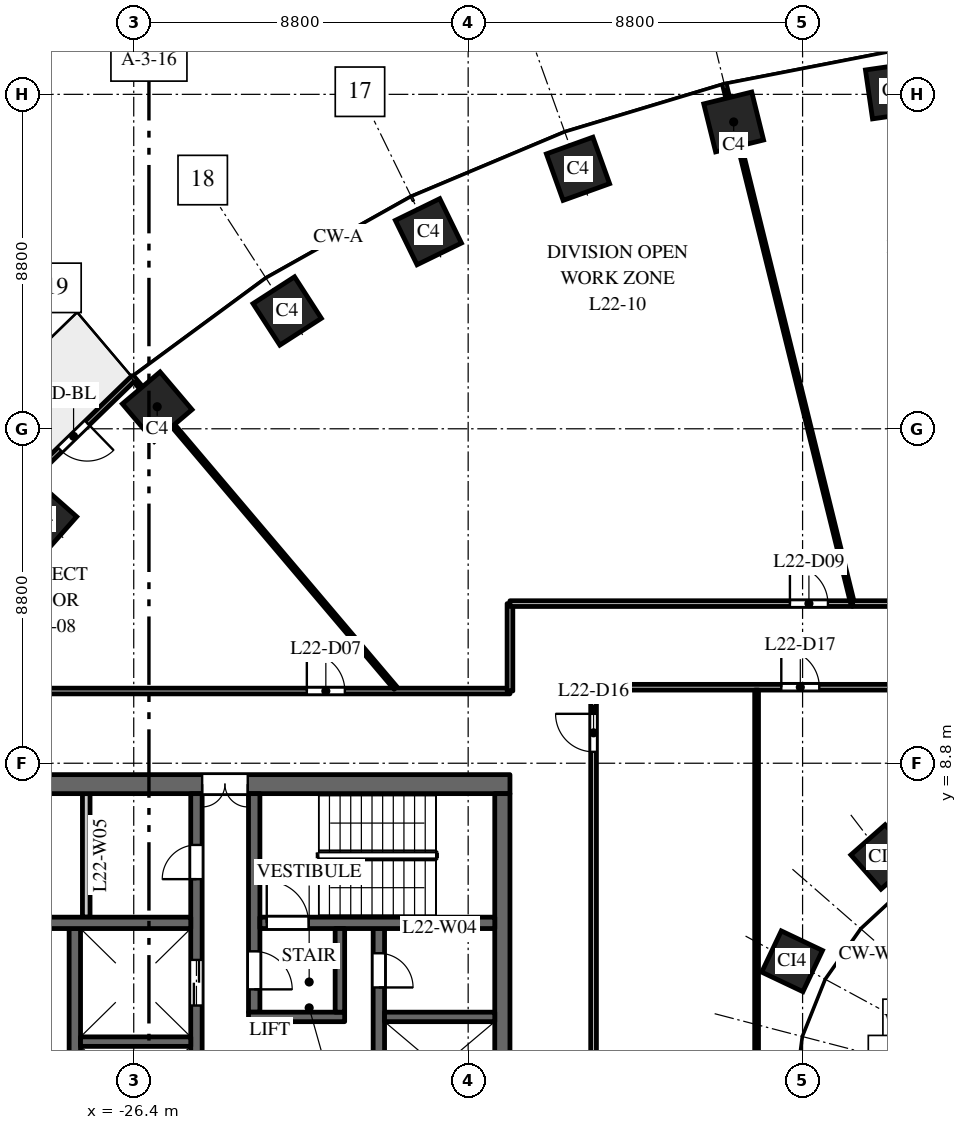
"""IFC4 building model, lengths in metres.
Left out: names, types, materials, properties, quantities, classifications, styles, units other than length and angle.
Written with IfcOpenShell. Run it as: python <this file> out.ifc"""

import sys

from ifc_helpers import new_model, si_unit, direction, frame, frame_2d, origin, origin_2d, place, context, subcontext, project, spatial, rectangle, extrude, element, fill, save


model = new_model("IFC4")
c1 = context("Model", 3, precision=1e-05, world=origin(), true_north=direction((0.0, 1.0)))
c2 = subcontext(c1, "Body", "Model", "MODEL_VIEW")
j1 = project(units=[si_unit("LENGTHUNIT", "METRE"), si_unit("PLANEANGLEUNIT", "RADIAN")], contexts=[c1])
p1 = place(None, origin())
s1 = spatial("IfcSite", under=j1, at=p1, CompositionType="ELEMENT")
p2 = place(p1, origin())
s2 = spatial("IfcBuilding", under=s1, at=p2, CompositionType="ELEMENT")
p3 = place(p2, frame((0.0, 0.0, 100.0)))
s3 = spatial("IfcBuildingStorey", under=s2, at=p3, CompositionType="ELEMENT", Elevation=100.0)
for number, where, z_axis, x_axis in (
    (1, (-6.409, 26.491, 0.0), (0.0, 0.0, 1.0), (-0.99, -0.143, 0.0)),
    (2, (-10.613, 25.674, 0.0), (0.0, 0.0, 1.0), (-0.971, -0.24, 0.0)),
    (3, (-14.709, 24.441, 0.0), (0.0, 0.0, 1.0), (-0.941, -0.338, 0.0)),
    (4, (-18.646, 22.785, 0.0), (0.0, 0.0, 1.0), (-0.898, -0.439, 0.0)),
    (5, (-22.362, 20.7, 0.0), (0.0, 0.0, 1.0), (-0.84, -0.542, 0.0)),
    (6, (-25.783, 18.18, 0.0), (0.0, 0.0, 1.0), (-0.763, -0.646, 0.0)),
    (7, (-28.819, 15.23, 0.0), (0.0, 0.0, 1.0), (-0.663, -0.749, 0.0)),
):
    element("IfcColumn", number, at=place(p3, frame(where, z_axis=z_axis, x_axis=x_axis)), inside=s3, PredefinedType="COLUMN", context=c2, shape_type="SweptSolid", body=[
        extrude(rectangle(XDim=1.3, YDim=1.3, at=origin_2d()), origin(), (0.0, 0.0, 1.0), 4.0),
    ])
for number, where, z_axis, x_axis in (
    (8, (-6.682, 6.334, 0.0), (0.0, 0.0, 1.0), (-0.751, -0.66, 0.0)),
    (9, (-9.076, 3.588, 0.0), (0.0, 0.0, 1.0), (-0.429, -0.903, 0.0)),
):
    element("IfcColumn", number, at=place(p3, frame(where, z_axis=z_axis, x_axis=x_axis)), inside=s3, PredefinedType="COLUMN", context=c2, shape_type="SweptSolid", body=[
        extrude(rectangle(XDim=1.2, YDim=1.2, at=origin_2d()), origin(), (0.0, 0.0, 1.0), 4.0),
    ])
p4 = place(p3, frame((-16.5, 8.25, 0.0), z_axis=(0.0, 0.0, 1.0), x_axis=(-1.0, 0.0, 0.0)))
e10 = element("IfcWall", 10, at=p4, inside=s3, PredefinedType="SHEAR", context=c2, shape_type="SweptSolid", body=[
    extrude(rectangle(XDim=15.0, YDim=0.5, at=frame_2d((7.5, 0.0))), origin(), (0.0, 0.0, 1.0), 3.7),
])
p5 = place(p4, frame((6.9, 0.0, 0.0)))
e11 = element("IfcOpeningElement", 11, at=p5, cuts=e10, PredefinedType="OPENING", context=c2, shape_type="SweptSolid", body=[
    extrude(rectangle(XDim=1.2, YDim=2.1, at=frame_2d((0.6, 1.05))), frame((0.0, 0.26, 0.0), z_axis=(0.0, -1.0, 0.0), x_axis=(1.0, 0.0, 0.0)), (0.0, 0.0, 1.0), 0.52),
])
p6 = place(p4, frame((12.425, 0.0, 0.0)))
e12 = element("IfcOpeningElement", 12, at=p6, cuts=e10, PredefinedType="OPENING", context=c2, shape_type="SweptSolid", body=[
    extrude(rectangle(XDim=0.9, YDim=2.1, at=frame_2d((0.45, 1.05))), frame((0.0, 0.26, 0.0), z_axis=(0.0, -1.0, 0.0), x_axis=(1.0, 0.0, 0.0)), (0.0, 0.0, 1.0), 0.52),
])
p7 = place(p3, frame((-27.95, -4.45, 0.0), z_axis=(0.0, 0.0, 1.0), x_axis=(0.0, 1.0, 0.0)))
e13 = element("IfcWall", 13, at=p7, inside=s3, PredefinedType="SHEAR", context=c2, shape_type="SweptSolid", body=[
    extrude(rectangle(XDim=8.9, YDim=0.3, at=frame_2d((4.45, 0.0))), origin(), (0.0, 0.0, 1.0), 3.7),
])
p8 = place(p3, frame((-19.95, -4.45, 0.0), z_axis=(0.0, 0.0, 1.0), x_axis=(0.0, 1.0, 0.0)))
e14 = element("IfcWall", 14, at=p8, inside=s3, PredefinedType="SHEAR", context=c2, shape_type="SweptSolid", body=[
    extrude(rectangle(XDim=8.9, YDim=0.3, at=frame_2d((4.45, 0.0))), origin(), (0.0, 0.0, 1.0), 3.7),
])
p9 = place(p8, frame((0.775, 0.0, 0.0)))
e15 = element("IfcOpeningElement", 15, at=p9, cuts=e14, PredefinedType="OPENING", context=c2, shape_type="SweptSolid", body=[
    extrude(rectangle(XDim=1.2, YDim=2.1, at=frame_2d((0.6, 1.05))), frame((0.0, 0.16, 0.0), z_axis=(0.0, -1.0, 0.0), x_axis=(1.0, 0.0, 0.0)), (0.0, 0.0, 1.0), 0.32),
])
p10 = place(p8, frame((7.35, 0.0, 0.0)))
e16 = element("IfcOpeningElement", 16, at=p10, cuts=e14, PredefinedType="OPENING", context=c2, shape_type="SweptSolid", body=[
    extrude(rectangle(XDim=0.9, YDim=2.1, at=frame_2d((0.45, 1.05))), frame((0.0, 0.16, 0.0), z_axis=(0.0, -1.0, 0.0), x_axis=(1.0, 0.0, 0.0)), (0.0, 0.0, 1.0), 0.32),
])
p11 = place(p3, frame((-24.75, -8.0, 0.0), z_axis=(0.0, 0.0, 1.0), x_axis=(0.0, 1.0, 0.0)))
e17 = element("IfcWall", 17, at=p11, inside=s3, PredefinedType="SHEAR", context=c2, shape_type="SweptSolid", body=[
    extrude(rectangle(XDim=16.0, YDim=0.3, at=frame_2d((8.0, 0.0))), origin(), (0.0, 0.0, 1.0), 3.7),
])
p12 = place(p11, frame((4.425, 0.0, 0.0)))
e18 = element("IfcOpeningElement", 18, at=p12, cuts=e17, PredefinedType="OPENING", context=c2, shape_type="SweptSolid", body=[
    extrude(rectangle(XDim=1.1, YDim=2.1, at=frame_2d((0.55, 1.05))), frame((0.0, 0.16, 0.0), z_axis=(0.0, -1.0, 0.0), x_axis=(1.0, 0.0, 0.0)), (0.0, 0.0, 1.0), 0.32),
])
p13 = place(p11, frame((7.45, 0.0, 0.0)))
e19 = element("IfcOpeningElement", 19, at=p13, cuts=e17, PredefinedType="OPENING", context=c2, shape_type="SweptSolid", body=[
    extrude(rectangle(XDim=1.1, YDim=2.1, at=frame_2d((0.55, 1.05))), frame((0.0, 0.16, 0.0), z_axis=(0.0, -1.0, 0.0), x_axis=(1.0, 0.0, 0.0)), (0.0, 0.0, 1.0), 0.32),
])
p14 = place(p11, frame((10.425, 0.0, 0.0)))
e20 = element("IfcOpeningElement", 20, at=p14, cuts=e17, PredefinedType="OPENING", context=c2, shape_type="SweptSolid", body=[
    extrude(rectangle(XDim=1.2, YDim=2.1, at=frame_2d((0.6, 1.05))), frame((0.0, 0.16, 0.0), z_axis=(0.0, -1.0, 0.0), x_axis=(1.0, 0.0, 0.0)), (0.0, 0.0, 1.0), 0.32),
])
p15 = place(p11, frame((13.75, 0.0, 0.0)))
e21 = element("IfcOpeningElement", 21, at=p15, cuts=e17, PredefinedType="OPENING", context=c2, shape_type="SweptSolid", body=[
    extrude(rectangle(XDim=0.9, YDim=2.1, at=frame_2d((0.45, 1.05))), frame((0.0, 0.16, 0.0), z_axis=(0.0, -1.0, 0.0), x_axis=(1.0, 0.0, 0.0)), (0.0, 0.0, 1.0), 0.32),
])
p16 = place(p11, frame((1.975, 0.0, 0.0)))
e22 = element("IfcOpeningElement", 22, at=p16, cuts=e17, PredefinedType="OPENING", context=c2, shape_type="SweptSolid", body=[
    extrude(rectangle(XDim=0.9, YDim=2.1, at=frame_2d((0.45, 1.05))), frame((0.0, 0.16, 0.0), z_axis=(0.0, -1.0, 0.0), x_axis=(1.0, 0.0, 0.0)), (0.0, 0.0, 1.0), 0.32),
])
p17 = place(p11, frame((0.35, 0.0, 0.0)))
e23 = element("IfcOpeningElement", 23, at=p17, cuts=e17, PredefinedType="OPENING", context=c2, shape_type="SweptSolid", body=[
    extrude(rectangle(XDim=0.9, YDim=2.1, at=frame_2d((0.45, 1.05))), frame((0.0, 0.16, 0.0), z_axis=(0.0, -1.0, 0.0), x_axis=(1.0, 0.0, 0.0)), (0.0, 0.0, 1.0), 0.32),
])
p18 = place(p3, frame((-16.7, -8.0, 0.0), z_axis=(0.0, 0.0, 1.0), x_axis=(0.0, 1.0, 0.0)))
e24 = element("IfcWall", 24, at=p18, inside=s3, PredefinedType="SHEAR", context=c2, shape_type="SweptSolid", body=[
    extrude(rectangle(XDim=16.0, YDim=0.4, at=frame_2d((8.0, 0.0))), origin(), (0.0, 0.0, 1.0), 3.7),
])
p19 = place(p3, frame((-24.9, 4.6, 0.0), z_axis=(0.0, 0.0, 1.0), x_axis=(-1.0, 0.0, 0.0)))
e25 = element("IfcWall", 25, at=p19, inside=s3, PredefinedType="SHEAR", context=c2, shape_type="SweptSolid", body=[
    extrude(rectangle(XDim=6.1, YDim=0.3, at=frame_2d((3.05, 0.0))), origin(), (0.0, 0.0, 1.0), 3.7),
])
p20 = place(p19, frame((4.2, 0.0, 0.0)))
e26 = element("IfcOpeningElement", 26, at=p20, cuts=e25, PredefinedType="OPENING", context=c2, shape_type="SweptSolid", body=[
    extrude(rectangle(XDim=0.9, YDim=2.1, at=frame_2d((0.45, 1.05))), frame((0.0, 0.16, 0.0), z_axis=(0.0, -1.0, 0.0), x_axis=(1.0, 0.0, 0.0)), (0.0, 0.0, 1.0), 0.32),
])
p21 = place(p3, frame((-27.65, 4.75, 0.0), z_axis=(0.0, 0.0, 1.0), x_axis=(0.0, 1.0, 0.0)))
e27 = element("IfcWall", 27, at=p21, inside=s3, PredefinedType="PARTITIONING", context=c2, shape_type="SweptSolid", body=[
    extrude(rectangle(XDim=3.25, YDim=0.2, at=frame_2d((1.625, 0.0))), origin(), (0.0, 0.0, 1.0), 3.7),
])
for number, where, z_axis, x_axis in (
    (28, (-16.9, 2.125, 0.0), (0.0, 0.0, 1.0), (-1.0, 0.0, 0.0)),
    (29, (-24.9, 1.475, 0.0), (0.0, 0.0, 1.0), (-1.0, 0.0, 0.0)),
):
    element("IfcWall", number, at=place(p3, frame(where, z_axis=z_axis, x_axis=x_axis)), inside=s3, PredefinedType="SHEAR", context=c2, shape_type="SweptSolid", body=[
        extrude(rectangle(XDim=2.9, YDim=0.25, at=frame_2d((1.45, 0.0))), origin(), (0.0, 0.0, 1.0), 3.7),
    ])
p22 = place(p3, frame((-23.23, 2.25, 0.0), z_axis=(0.0, 0.0, 1.0), x_axis=(0.0, 1.0, 0.0)))
e30 = element("IfcWall", 30, at=p22, inside=s3, PredefinedType="SHEAR", context=c2, shape_type="SweptSolid", body=[
    extrude(rectangle(XDim=5.75, YDim=0.3, at=frame_2d((2.875, 0.0))), origin(), (0.0, 0.0, 1.0), 3.7),
])
p23 = place(p22, frame((0.6, 0.0, 0.0)))
e31 = element("IfcOpeningElement", 31, at=p23, cuts=e30, PredefinedType="OPENING", context=c2, shape_type="SweptSolid", body=[
    extrude(rectangle(XDim=1.0, YDim=2.1, at=frame_2d((0.5, 1.05))), frame((0.0, 0.16, 0.0), z_axis=(0.0, -1.0, 0.0), x_axis=(1.0, 0.0, 0.0)), (0.0, 0.0, 1.0), 0.32),
])
p24 = place(p3, frame((-16.9, 4.6, 0.0), z_axis=(0.0, 0.0, 1.0), x_axis=(-1.0, 0.0, 0.0)))
e32 = element("IfcWall", 32, at=p24, inside=s3, PredefinedType="SHEAR", context=c2, shape_type="SweptSolid", body=[
    extrude(rectangle(XDim=6.18, YDim=0.3, at=frame_2d((3.09, 0.0))), origin(), (0.0, 0.0, 1.0), 3.7),
])
p25 = place(p24, frame((4.9, 0.0, 0.0)))
e33 = element("IfcOpeningElement", 33, at=p25, cuts=e32, PredefinedType="OPENING", context=c2, shape_type="SweptSolid", body=[
    extrude(rectangle(XDim=1.1, YDim=2.1, at=frame_2d((0.55, 1.05))), frame((0.0, 0.16, 0.0), z_axis=(0.0, -1.0, 0.0), x_axis=(1.0, 0.0, 0.0)), (0.0, 0.0, 1.0), 0.32),
])
p26 = place(p3, frame((-20.85, 2.125, 0.0), z_axis=(0.0, 0.0, 1.0), x_axis=(-1.0, 0.0, 0.0)))
e34 = element("IfcWall", 34, at=p26, inside=s3, PredefinedType="SHEAR", context=c2, shape_type="SweptSolid", body=[
    extrude(rectangle(XDim=2.53, YDim=0.25, at=frame_2d((1.265, 0.0))), origin(), (0.0, 0.0, 1.0), 3.7),
])
p27 = place(p3, frame((-20.975, 2.25, 0.0), z_axis=(0.0, 0.0, 1.0), x_axis=(0.0, 1.0, 0.0)))
e35 = element("IfcWall", 35, at=p27, inside=s3, PredefinedType="SHEAR", context=c2, shape_type="SweptSolid", body=[
    extrude(rectangle(XDim=2.2, YDim=0.25, at=frame_2d((1.1, 0.0))), origin(), (0.0, 0.0, 1.0), 3.7),
])
p28 = place(p3, frame((-26.396, 18.943, 0.0), z_axis=(0.0, 0.0, 1.0), x_axis=(-0.717214761864, -0.696852197647, 0.0)))
e36 = element("IfcWall", 36, at=p28, inside=s3, PredefinedType="STANDARD", context=c2, shape_type="SweptSolid", body=[
    extrude(rectangle(XDim=4.424, YDim=0.15, at=frame_2d((2.212, 0.0))), origin(), (0.0, 0.0, 1.0), 3.7),
])
p29 = place(p28, frame((1.712, 0.0, 0.0)))
e37 = element("IfcOpeningElement", 37, at=p29, cuts=e36, PredefinedType="OPENING", context=c2, shape_type="SweptSolid", body=[
    extrude(rectangle(XDim=1.0, YDim=2.4, at=frame_2d((0.5, 1.2))), frame((0.0, 0.085, 0.0), z_axis=(0.0, -1.0, 0.0), x_axis=(1.0, 0.0, 0.0)), (0.0, 0.0, 1.0), 0.17),
])
p30 = place(p3, frame((-31.5, 10.7, 0.0), z_axis=(0.0, 0.0, 1.0), x_axis=(1.0, 0.0, 0.0)))
e38 = element("IfcWall", 38, at=p30, inside=s3, PredefinedType="PARTITIONING", context=c2, shape_type="SweptSolid", body=[
    extrude(rectangle(XDim=15.0, YDim=0.15, at=frame_2d((7.5, 0.0))), origin(), (0.0, 0.0, 1.0), 3.1),
])
p31 = place(p30, frame((9.655, 0.0, 0.0)))
e39 = element("IfcOpeningElement", 39, at=p31, cuts=e38, PredefinedType="OPENING", context=c2, shape_type="SweptSolid", body=[
    extrude(rectangle(XDim=1.0, YDim=2.1, at=frame_2d((0.5, 1.05))), frame((0.0, 0.085, 0.0), z_axis=(0.0, -1.0, 0.0), x_axis=(1.0, 0.0, 0.0)), (0.0, 0.0, 1.0), 0.17),
])
p32 = place(p3, frame((-26.43, 18.945, 0.0), z_axis=(0.0, 0.0, 1.0), x_axis=(0.646400187952, -0.762998556365, 0.0)))
e40 = element("IfcWall", 40, at=p32, inside=s3, PredefinedType="PARTITIONING", context=c2, shape_type="SweptSolid", body=[
    extrude(rectangle(XDim=10.704, YDim=0.1, at=frame_2d((5.352, 0.0))), origin(), (0.0, 0.0, 1.0), 3.7),
])
p33 = place(p3, frame((-16.5, 10.7, 0.0), z_axis=(0.0, 0.0, 1.0), x_axis=(0.0, 1.0, 0.0)))
e41 = element("IfcWall", 41, at=p33, inside=s3, PredefinedType="PARTITIONING", context=c2, shape_type="SweptSolid", body=[
    extrude(rectangle(XDim=2.3, YDim=0.15, at=frame_2d((1.15, 0.0))), origin(), (0.0, 0.0, 1.0), 2.75),
])
p34 = place(p3, frame((-16.5, 13.0, 0.0), z_axis=(0.0, 0.0, 1.0), x_axis=(1.0, 0.0, 0.0)))
e42 = element("IfcWall", 42, at=p34, inside=s3, PredefinedType="PARTITIONING", context=c2, shape_type="SweptSolid", body=[
    extrude(rectangle(XDim=9.001, YDim=0.15, at=frame_2d((4.5, 0.0))), origin(), (0.0, 0.0, 1.0), 2.85),
])
p35 = place(p34, frame((7.367, 0.0, 0.0)))
e43 = element("IfcOpeningElement", 43, at=p35, cuts=e42, PredefinedType="OPENING", context=c2, shape_type="SweptSolid", body=[
    extrude(rectangle(XDim=1.0, YDim=2.1, at=frame_2d((0.5, 1.05))), frame((0.0, 0.085, 0.0), z_axis=(0.0, -1.0, 0.0), x_axis=(1.0, 0.0, 0.0)), (0.0, 0.0, 1.0), 0.17),
])
p36 = place(p3, frame((-14.3, -10.8, 0.0), z_axis=(0.0, 0.0, 1.0), x_axis=(0.0, 1.0, 0.0)))
e44 = element("IfcWall", 44, at=p36, inside=s3, PredefinedType="PARTITIONING", context=c2, shape_type="SweptSolid", body=[
    extrude(rectangle(XDim=21.6, YDim=0.15, at=frame_2d((10.8, 0.0))), origin(), (0.0, 0.0, 1.0), 2.75),
])
p37 = place(p36, frame((19.9, 0.0, 0.0)))
e45 = element("IfcOpeningElement", 45, at=p37, cuts=e44, PredefinedType="OPENING", context=c2, shape_type="SweptSolid", body=[
    extrude(rectangle(XDim=1.0, YDim=2.1, at=frame_2d((0.5, 1.05))), frame((0.0, 0.085, 0.0), z_axis=(0.0, -1.0, 0.0), x_axis=(1.0, 0.0, 0.0)), (0.0, 0.0, 1.0), 0.17),
])
p38 = place(p3, frame((-14.3, 10.8, 0.0), z_axis=(0.0, 0.0, 1.0), x_axis=(1.0, 0.0, 0.0)))
e46 = element("IfcWall", 46, at=p38, inside=s3, PredefinedType="PARTITIONING", context=c2, shape_type="SweptSolid", body=[
    extrude(rectangle(XDim=28.6, YDim=0.15, at=frame_2d((14.3, 0.0))), origin(), (0.0, 0.0, 1.0), 2.85),
])
p39 = place(p38, frame((4.94, 0.0, 0.0)))
e47 = element("IfcOpeningElement", 47, at=p39, cuts=e46, PredefinedType="OPENING", context=c2, shape_type="SweptSolid", body=[
    extrude(rectangle(XDim=1.0, YDim=2.1, at=frame_2d((0.5, 1.05))), frame((0.0, 0.085, 0.0), z_axis=(0.0, -1.0, 0.0), x_axis=(1.0, 0.0, 0.0)), (0.0, 0.0, 1.0), 0.17),
])
p40 = place(p38, frame((9.707, 0.0, 0.0)))
e48 = element("IfcOpeningElement", 48, at=p40, cuts=e46, PredefinedType="OPENING", context=c2, shape_type="SweptSolid", body=[
    extrude(rectangle(XDim=1.0, YDim=2.1, at=frame_2d((0.5, 1.05))), frame((0.0, 0.085, 0.0), z_axis=(0.0, -1.0, 0.0), x_axis=(1.0, 0.0, 0.0)), (0.0, 0.0, 1.0), 0.17),
])
p41 = place(p38, frame((14.473, 0.0, 0.0)))
e49 = element("IfcOpeningElement", 49, at=p41, cuts=e46, PredefinedType="OPENING", context=c2, shape_type="SweptSolid", body=[
    extrude(rectangle(XDim=1.0, YDim=2.1, at=frame_2d((0.5, 1.05))), frame((0.0, 0.085, 0.0), z_axis=(0.0, -1.0, 0.0), x_axis=(1.0, 0.0, 0.0)), (0.0, 0.0, 1.0), 0.17),
])
p42 = place(p3, frame((-10.853, 26.646, 0.0), z_axis=(0.0, 0.0, 1.0), x_axis=(0.239763745499, -0.97083126564, 0.0)))
e50 = element("IfcWall", 50, at=p42, inside=s3, PredefinedType="PARTITIONING", context=c2, shape_type="SweptSolid", body=[
    extrude(rectangle(XDim=14.056, YDim=0.1, at=frame_2d((7.028, 0.0))), origin(), (0.0, 0.0, 1.0), 2.85),
])
p43 = place(p3, frame((-10.01, -10.725, 0.0), z_axis=(0.0, 0.0, 1.0), x_axis=(0.0, 1.0, 0.0)))
e51 = element("IfcWall", 51, at=p43, inside=s3, PredefinedType="PARTITIONING", context=c2, shape_type="SweptSolid", body=[
    extrude(rectangle(XDim=21.45, YDim=0.1, at=frame_2d((10.725, 0.0))), origin(), (0.0, 0.0, 1.0), 2.75),
])
p44 = place(p3, frame((-7.483, 13.0, 0.0), z_axis=(0.0, 0.0, 1.0), x_axis=(1.0, 0.0, 0.0)))
e52 = element("IfcWall", 52, at=p44, inside=s3, PredefinedType="PARTITIONING", context=c2, shape_type="SweptSolid", body=[
    extrude(rectangle(XDim=7.184, YDim=0.15, at=frame_2d((3.592, 0.0))), origin(), (0.0, 0.0, 1.0), 2.85),
])
p45 = place(p44, frame((4.683, 0.0, 0.0)))
e53 = element("IfcOpeningElement", 53, at=p45, cuts=e52, PredefinedType="OPENING", context=c2, shape_type="SweptSolid", body=[
    extrude(rectangle(XDim=1.0, YDim=2.1, at=frame_2d((0.5, 1.05))), frame((0.0, 0.085, 0.0), z_axis=(0.0, -1.0, 0.0), x_axis=(1.0, 0.0, 0.0)), (0.0, 0.0, 1.0), 0.17),
])
p46 = place(p14, origin())
e54 = element("IfcDoor", 54, at=p46, inside=s3, OperationType="DOUBLE_DOOR_SLIDING", PredefinedType="DOOR", context=c2, shape_type="SweptSolid", body=[
    extrude(rectangle(XDim=1.2, YDim=2.1, at=frame_2d((0.6, 1.05))), frame((0.0, 0.025, 0.0), z_axis=(0.0, -1.0, 0.0), x_axis=(1.0, 0.0, 0.0)), (0.0, 0.0, 1.0), 0.05),
])
fill(e20, e54)
p47 = place(p25, origin())
e55 = element("IfcDoor", 55, at=p47, inside=s3, OperationType="SINGLE_SWING_RIGHT", PredefinedType="DOOR", context=c2, shape_type="SweptSolid", body=[
    extrude(rectangle(XDim=1.1, YDim=2.1, at=frame_2d((0.55, 1.05))), frame((0.0, 0.025, 0.0), z_axis=(0.0, -1.0, 0.0), x_axis=(1.0, 0.0, 0.0)), (0.0, 0.0, 1.0), 0.05),
])
fill(e33, e55)
p48 = place(p23, origin())
e56 = element("IfcDoor", 56, at=p48, inside=s3, OperationType="SINGLE_SWING_LEFT", PredefinedType="DOOR", context=c2, shape_type="SweptSolid", body=[
    extrude(rectangle(XDim=1.0, YDim=2.1, at=frame_2d((0.5, 1.05))), frame((0.0, 0.025, 0.0), z_axis=(0.0, -1.0, 0.0), x_axis=(1.0, 0.0, 0.0)), (0.0, 0.0, 1.0), 0.05),
])
fill(e31, e56)
p49 = place(p5, origin())
e57 = element("IfcDoor", 57, at=p49, inside=s3, OperationType="DOUBLE_DOOR_DOUBLE_SWING", PredefinedType="DOOR", context=c2, shape_type="SweptSolid", body=[
    extrude(rectangle(XDim=1.2, YDim=2.1, at=frame_2d((0.6, 1.05))), frame((0.0, 0.025, 0.0), z_axis=(0.0, -1.0, 0.0), x_axis=(1.0, 0.0, 0.0)), (0.0, 0.0, 1.0), 0.05),
])
fill(e11, e57)
p50 = place(p10, origin())
e58 = element("IfcDoor", 58, at=p50, inside=s3, OperationType="SINGLE_SWING_LEFT", PredefinedType="DOOR", context=c2, shape_type="SweptSolid", body=[
    extrude(rectangle(XDim=0.9, YDim=2.1, at=frame_2d((0.45, 1.05))), frame((0.0, 0.025, 0.0), z_axis=(0.0, -1.0, 0.0), x_axis=(1.0, 0.0, 0.0)), (0.0, 0.0, 1.0), 0.05),
])
fill(e16, e58)
p51 = place(p15, origin())
e59 = element("IfcDoor", 59, at=p51, inside=s3, OperationType="SINGLE_SWING_RIGHT", PredefinedType="DOOR", context=c2, shape_type="SweptSolid", body=[
    extrude(rectangle(XDim=0.9, YDim=2.1, at=frame_2d((0.45, 1.05))), frame((0.0, 0.025, 0.0), z_axis=(0.0, -1.0, 0.0), x_axis=(1.0, 0.0, 0.0)), (0.0, 0.0, 1.0), 0.05),
])
fill(e21, e59)
p52 = place(p29, origin())
e60 = element("IfcDoor", 60, at=p52, inside=s3, OperationType="SINGLE_SWING_LEFT", PredefinedType="DOOR", context=c2, shape_type="SweptSolid", body=[
    extrude(rectangle(XDim=1.0, YDim=2.4, at=frame_2d((0.5, 1.2))), frame((0.0, 0.025, 0.0), z_axis=(0.0, -1.0, 0.0), x_axis=(1.0, 0.0, 0.0)), (0.0, 0.0, 1.0), 0.05),
])
fill(e37, e60)
p53 = place(p31, origin())
e61 = element("IfcDoor", 61, at=p53, inside=s3, OperationType="SINGLE_SWING_LEFT", PredefinedType="DOOR", context=c2, shape_type="SweptSolid", body=[
    extrude(rectangle(XDim=1.0, YDim=2.1, at=frame_2d((0.5, 1.05))), frame((0.0, 0.025, 0.0), z_axis=(0.0, -1.0, 0.0), x_axis=(1.0, 0.0, 0.0)), (0.0, 0.0, 1.0), 0.05),
])
fill(e39, e61)
p54 = place(p35, origin())
e62 = element("IfcDoor", 62, at=p54, inside=s3, OperationType="SINGLE_SWING_LEFT", PredefinedType="DOOR", context=c2, shape_type="SweptSolid", body=[
    extrude(rectangle(XDim=1.0, YDim=2.1, at=frame_2d((0.5, 1.05))), frame((0.0, 0.025, 0.0), z_axis=(0.0, -1.0, 0.0), x_axis=(1.0, 0.0, 0.0)), (0.0, 0.0, 1.0), 0.05),
])
fill(e43, e62)
p55 = place(p37, origin())
e63 = element("IfcDoor", 63, at=p55, inside=s3, OperationType="SINGLE_SWING_RIGHT", PredefinedType="DOOR", context=c2, shape_type="SweptSolid", body=[
    extrude(rectangle(XDim=1.0, YDim=2.1, at=frame_2d((0.5, 1.05))), frame((0.0, 0.025, 0.0), z_axis=(0.0, -1.0, 0.0), x_axis=(1.0, 0.0, 0.0)), (0.0, 0.0, 1.0), 0.05),
])
fill(e45, e63)
p56 = place(p39, origin())
e64 = element("IfcDoor", 64, at=p56, inside=s3, OperationType="SINGLE_SWING_LEFT", PredefinedType="DOOR", context=c2, shape_type="SweptSolid", body=[
    extrude(rectangle(XDim=1.0, YDim=2.1, at=frame_2d((0.5, 1.05))), frame((0.0, 0.025, 0.0), z_axis=(0.0, -1.0, 0.0), x_axis=(1.0, 0.0, 0.0)), (0.0, 0.0, 1.0), 0.05),
])
fill(e47, e64)
save(model, sys.argv[1])
